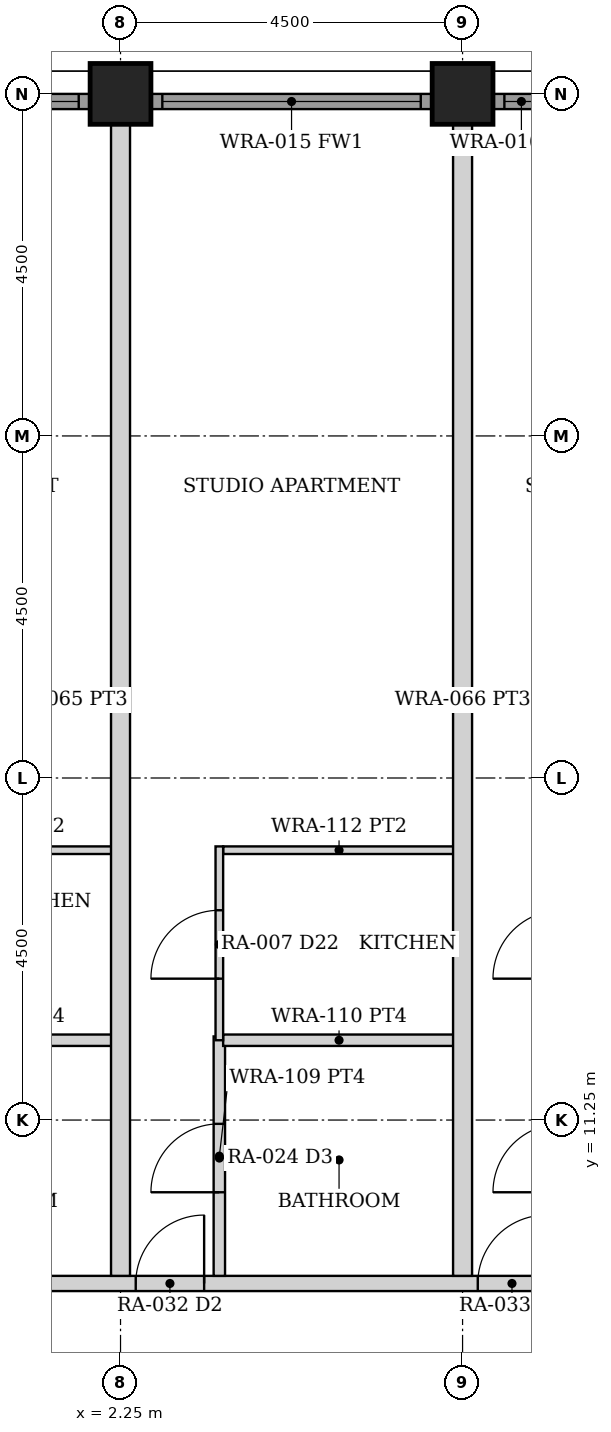
"""IFC4 building model, lengths in metres.
Left out: names, types, materials, properties, quantities, classifications, styles, units other than length and angle.
Written with IfcOpenShell. Run it as: python <this file> out.ifc"""

import sys

from ifc_helpers import new_model, si_unit, direction, frame, frame_2d, origin, origin_2d, place, context, subcontext, project, spatial, rectangle, hollow_rectangle, extrude, element, fill, save


model = new_model("IFC4")
c1 = context("Model", 3, precision=1e-05, world=origin(), true_north=direction((0.0, 1.0)))
c2 = subcontext(c1, "Body", "Model", "MODEL_VIEW")
j1 = project(units=[si_unit("LENGTHUNIT", "METRE"), si_unit("PLANEANGLEUNIT", "RADIAN")], contexts=[c1])
p1 = place(None, origin())
s1 = spatial("IfcSite", under=j1, at=p1, CompositionType="ELEMENT")
p2 = place(p1, origin())
s2 = spatial("IfcBuilding", under=s1, at=p2, CompositionType="ELEMENT")
p3 = place(p2, frame((0.0, 0.0, 26.5)))
s3 = spatial("IfcBuildingStorey", under=s2, at=p3, CompositionType="ELEMENT", Elevation=26.5)
for number, where, z_axis, x_axis in (
    (1, (2.25, 24.75, 0.0), (0.0, 0.0, 1.0), (0.0, 1.0, 0.0)),
    (2, (6.75, 24.75, 0.0), (0.0, 0.0, 1.0), (0.0, 1.0, 0.0)),
):
    element("IfcColumn", number, at=place(p3, frame(where, z_axis=z_axis, x_axis=x_axis)), inside=s3, PredefinedType="COLUMN", context=c2, shape_type="SweptSolid", body=[
        extrude(hollow_rectangle(XDim=0.8, YDim=0.8, WallThickness=0.08, at=origin_2d()), origin(), (0.0, 0.0, 1.0), 3.5),
    ])
p4 = place(p3, frame((-1.845, 24.65, 0.0), z_axis=(0.0, 0.0, 1.0), x_axis=(1.0, 0.0, 0.0)))
e3 = element("IfcWall", 3, at=p4, inside=s3, PredefinedType="SOLIDWALL", context=c2, shape_type="SweptSolid", body=[
    extrude(rectangle(XDim=3.69, YDim=0.2, at=frame_2d((1.845, 0.0))), origin(), (0.0, 0.0, 1.0), 2.379),
])
p5 = place(p4, frame((0.145, 0.0, 0.3)))
e4 = element("IfcOpeningElement", 4, at=p5, cuts=e3, PredefinedType="OPENING", context=c2, shape_type="SweptSolid", body=[
    extrude(rectangle(XDim=3.4, YDim=1.929, at=frame_2d((1.7, 0.964))), frame((0.0, 0.11, 0.0), z_axis=(0.0, -1.0, 0.0), x_axis=(1.0, 0.0, 0.0)), (0.0, 0.0, 1.0), 0.22),
])
p6 = place(p3, frame((2.655, 24.65, 0.0), z_axis=(0.0, 0.0, 1.0), x_axis=(1.0, 0.0, 0.0)))
e5 = element("IfcWall", 5, at=p6, inside=s3, PredefinedType="SOLIDWALL", context=c2, shape_type="SweptSolid", body=[
    extrude(rectangle(XDim=3.69, YDim=0.2, at=frame_2d((1.845, 0.0))), origin(), (0.0, 0.0, 1.0), 2.379),
])
p7 = place(p6, frame((0.145, 0.0, 0.3)))
e6 = element("IfcOpeningElement", 6, at=p7, cuts=e5, PredefinedType="OPENING", context=c2, shape_type="SweptSolid", body=[
    extrude(rectangle(XDim=3.4, YDim=1.929, at=frame_2d((1.7, 0.964))), frame((0.0, 0.11, 0.0), z_axis=(0.0, -1.0, 0.0), x_axis=(1.0, 0.0, 0.0)), (0.0, 0.0, 1.0), 0.22),
])
p8 = place(p3, frame((7.155, 24.65, 0.0), z_axis=(0.0, 0.0, 1.0), x_axis=(1.0, 0.0, 0.0)))
e7 = element("IfcWall", 7, at=p8, inside=s3, PredefinedType="SOLIDWALL", context=c2, shape_type="SweptSolid", body=[
    extrude(rectangle(XDim=3.69, YDim=0.2, at=frame_2d((1.845, 0.0))), origin(), (0.0, 0.0, 1.0), 2.379),
])
p9 = place(p8, frame((0.145, 0.0, 0.3)))
e8 = element("IfcOpeningElement", 8, at=p9, cuts=e7, PredefinedType="OPENING", context=c2, shape_type="SweptSolid", body=[
    extrude(rectangle(XDim=3.4, YDim=1.929, at=frame_2d((1.7, 0.964))), frame((0.0, 0.11, 0.0), z_axis=(0.0, -1.0, 0.0), x_axis=(1.0, 0.0, 0.0)), (0.0, 0.0, 1.0), 0.22),
])
p10 = place(p3, frame((-24.55, 9.1, 0.0), z_axis=(0.0, 0.0, 1.0), x_axis=(1.0, 0.0, 0.0)))
e9 = element("IfcWall", 9, at=p10, inside=s3, PredefinedType="PARTITIONING", context=c2, shape_type="SweptSolid", body=[
    extrude(rectangle(XDim=49.1, YDim=0.2, at=frame_2d((24.55, 0.0))), origin(), (0.0, 0.0, 1.0), 2.373),
])
p11 = place(p10, frame((5.1, 0.0, 0.0)))
e10 = element("IfcOpeningElement", 10, at=p11, cuts=e9, PredefinedType="OPENING", context=c2, shape_type="SweptSolid", body=[
    extrude(rectangle(XDim=0.9, YDim=2.1, at=frame_2d((0.45, 1.05))), frame((0.0, 0.11, 0.0), z_axis=(0.0, -1.0, 0.0), x_axis=(1.0, 0.0, 0.0)), (0.0, 0.0, 1.0), 0.22),
])
p12 = place(p10, frame((9.0, 0.0, 0.0)))
e11 = element("IfcOpeningElement", 11, at=p12, cuts=e9, PredefinedType="OPENING", context=c2, shape_type="SweptSolid", body=[
    extrude(rectangle(XDim=0.9, YDim=2.1, at=frame_2d((0.45, 1.05))), frame((0.0, 0.11, 0.0), z_axis=(0.0, -1.0, 0.0), x_axis=(1.0, 0.0, 0.0)), (0.0, 0.0, 1.0), 0.22),
])
p13 = place(p10, frame((13.5, 0.0, 0.0)))
e12 = element("IfcOpeningElement", 12, at=p13, cuts=e9, PredefinedType="OPENING", context=c2, shape_type="SweptSolid", body=[
    extrude(rectangle(XDim=0.9, YDim=2.1, at=frame_2d((0.45, 1.05))), frame((0.0, 0.11, 0.0), z_axis=(0.0, -1.0, 0.0), x_axis=(1.0, 0.0, 0.0)), (0.0, 0.0, 1.0), 0.22),
])
p14 = place(p10, frame((18.0, 0.0, 0.0)))
e13 = element("IfcOpeningElement", 13, at=p14, cuts=e9, PredefinedType="OPENING", context=c2, shape_type="SweptSolid", body=[
    extrude(rectangle(XDim=0.9, YDim=2.1, at=frame_2d((0.45, 1.05))), frame((0.0, 0.11, 0.0), z_axis=(0.0, -1.0, 0.0), x_axis=(1.0, 0.0, 0.0)), (0.0, 0.0, 1.0), 0.22),
])
p15 = place(p10, frame((22.5, 0.0, 0.0)))
e14 = element("IfcOpeningElement", 14, at=p15, cuts=e9, PredefinedType="OPENING", context=c2, shape_type="SweptSolid", body=[
    extrude(rectangle(XDim=0.9, YDim=2.1, at=frame_2d((0.45, 1.05))), frame((0.0, 0.11, 0.0), z_axis=(0.0, -1.0, 0.0), x_axis=(1.0, 0.0, 0.0)), (0.0, 0.0, 1.0), 0.22),
])
p16 = place(p10, frame((27.0, 0.0, 0.0)))
e15 = element("IfcOpeningElement", 15, at=p16, cuts=e9, PredefinedType="OPENING", context=c2, shape_type="SweptSolid", body=[
    extrude(rectangle(XDim=0.9, YDim=2.1, at=frame_2d((0.45, 1.05))), frame((0.0, 0.11, 0.0), z_axis=(0.0, -1.0, 0.0), x_axis=(1.0, 0.0, 0.0)), (0.0, 0.0, 1.0), 0.22),
])
p17 = place(p10, frame((31.5, 0.0, 0.0)))
e16 = element("IfcOpeningElement", 16, at=p17, cuts=e9, PredefinedType="OPENING", context=c2, shape_type="SweptSolid", body=[
    extrude(rectangle(XDim=0.9, YDim=2.1, at=frame_2d((0.45, 1.05))), frame((0.0, 0.11, 0.0), z_axis=(0.0, -1.0, 0.0), x_axis=(1.0, 0.0, 0.0)), (0.0, 0.0, 1.0), 0.22),
])
p18 = place(p10, frame((36.0, 0.0, 0.0)))
e17 = element("IfcOpeningElement", 17, at=p18, cuts=e9, PredefinedType="OPENING", context=c2, shape_type="SweptSolid", body=[
    extrude(rectangle(XDim=0.9, YDim=2.1, at=frame_2d((0.45, 1.05))), frame((0.0, 0.11, 0.0), z_axis=(0.0, -1.0, 0.0), x_axis=(1.0, 0.0, 0.0)), (0.0, 0.0, 1.0), 0.22),
])
p19 = place(p10, frame((43.1, 0.0, 0.0)))
e18 = element("IfcOpeningElement", 18, at=p19, cuts=e9, PredefinedType="OPENING", context=c2, shape_type="SweptSolid", body=[
    extrude(rectangle(XDim=0.9, YDim=2.1, at=frame_2d((0.45, 1.05))), frame((0.0, 0.11, 0.0), z_axis=(0.0, -1.0, 0.0), x_axis=(1.0, 0.0, 0.0)), (0.0, 0.0, 1.0), 0.22),
])
p20 = place(p3, frame((-0.9, 12.3, 0.0), z_axis=(0.0, 0.0, 1.0), x_axis=(1.0, 0.0, 0.0)))
e19 = element("IfcWall", 19, at=p20, inside=s3, PredefinedType="PARTITIONING", context=c2, shape_type="SweptSolid", body=[
    extrude(rectangle(XDim=3.05, YDim=0.15, at=frame_2d((1.525, 0.0))), origin(), (0.0, 0.0, 1.0), 2.373),
])
p21 = place(p3, frame((-0.9, 14.8, 0.0), z_axis=(0.0, 0.0, 1.0), x_axis=(1.0, 0.0, 0.0)))
e20 = element("IfcWall", 20, at=p21, inside=s3, PredefinedType="PARTITIONING", context=c2, shape_type="SweptSolid", body=[
    extrude(rectangle(XDim=3.05, YDim=0.1, at=frame_2d((1.525, 0.0))), origin(), (0.0, 0.0, 1.0), 2.373),
])
p22 = place(p3, frame((3.55, 9.2, 0.0), z_axis=(0.0, 0.0, 1.0), x_axis=(0.0, 1.0, 0.0)))
e21 = element("IfcWall", 21, at=p22, inside=s3, PredefinedType="PARTITIONING", context=c2, shape_type="SweptSolid", body=[
    extrude(rectangle(XDim=3.15, YDim=0.15, at=frame_2d((1.575, 0.0))), origin(), (0.0, 0.0, 1.0), 2.373),
])
p23 = place(p22, frame((1.1, 0.0, 0.0)))
e22 = element("IfcOpeningElement", 22, at=p23, cuts=e21, PredefinedType="OPENING", context=c2, shape_type="SweptSolid", body=[
    extrude(rectangle(XDim=0.9, YDim=2.1, at=frame_2d((0.45, 1.05))), frame((0.0, 0.085, 0.0), z_axis=(0.0, -1.0, 0.0), x_axis=(1.0, 0.0, 0.0)), (0.0, 0.0, 1.0), 0.17),
])
p24 = place(p3, frame((3.6, 12.3, 0.0), z_axis=(0.0, 0.0, 1.0), x_axis=(1.0, 0.0, 0.0)))
e23 = element("IfcWall", 23, at=p24, inside=s3, PredefinedType="PARTITIONING", context=c2, shape_type="SweptSolid", body=[
    extrude(rectangle(XDim=3.05, YDim=0.15, at=frame_2d((1.525, 0.0))), origin(), (0.0, 0.0, 1.0), 2.373),
])
p25 = place(p3, frame((3.6, 14.8, 0.0), z_axis=(0.0, 0.0, 1.0), x_axis=(1.0, 0.0, 0.0)))
e24 = element("IfcWall", 24, at=p25, inside=s3, PredefinedType="PARTITIONING", context=c2, shape_type="SweptSolid", body=[
    extrude(rectangle(XDim=3.05, YDim=0.1, at=frame_2d((1.525, 0.0))), origin(), (0.0, 0.0, 1.0), 2.373),
])
p26 = place(p3, frame((3.55, 12.3, 0.0), z_axis=(0.0, 0.0, 1.0), x_axis=(0.0, 1.0, 0.0)))
e25 = element("IfcWall", 25, at=p26, inside=s3, PredefinedType="PARTITIONING", context=c2, shape_type="SweptSolid", body=[
    extrude(rectangle(XDim=2.55, YDim=0.1, at=frame_2d((1.275, 0.0))), origin(), (0.0, 0.0, 1.0), 2.373),
])
p27 = place(p26, frame((0.81, 0.0, 0.0)))
e26 = element("IfcOpeningElement", 26, at=p27, cuts=e25, PredefinedType="OPENING", context=c2, shape_type="SweptSolid", body=[
    extrude(rectangle(XDim=0.9, YDim=2.1, at=frame_2d((0.45, 1.05))), frame((0.0, 0.06, 0.0), z_axis=(0.0, -1.0, 0.0), x_axis=(1.0, 0.0, 0.0)), (0.0, 0.0, 1.0), 0.12),
])
for number, where, z_axis, x_axis in (
    (27, (2.25, 9.2, 0.0), (0.0, 0.0, 1.0), (0.0, 1.0, 0.0)),
    (28, (6.75, 9.2, 0.0), (0.0, 0.0, 1.0), (0.0, 1.0, 0.0)),
):
    element("IfcWall", number, at=place(p3, frame(where, z_axis=z_axis, x_axis=x_axis)), inside=s3, PredefinedType="PARTITIONING", context=c2, shape_type="SweptSolid", body=[
        extrude(rectangle(XDim=15.15, YDim=0.25, at=frame_2d((7.575, 0.0))), origin(), (0.0, 0.0, 1.0), 2.373),
    ])
p28 = place(p5, origin())
e29 = element("IfcWindow", 29, at=p28, inside=s3, PartitioningType="SINGLE_PANEL", PredefinedType="WINDOW", context=c2, shape_type="SweptSolid", body=[
    extrude(rectangle(XDim=3.4, YDim=1.929, at=frame_2d((1.7, 0.964))), frame((0.0, 0.03, 0.0), z_axis=(0.0, -1.0, 0.0), x_axis=(1.0, 0.0, 0.0)), (0.0, 0.0, 1.0), 0.06),
])
fill(e4, e29)
p29 = place(p7, origin())
e30 = element("IfcWindow", 30, at=p29, inside=s3, PartitioningType="SINGLE_PANEL", PredefinedType="WINDOW", context=c2, shape_type="SweptSolid", body=[
    extrude(rectangle(XDim=3.4, YDim=1.929, at=frame_2d((1.7, 0.964))), frame((0.0, 0.03, 0.0), z_axis=(0.0, -1.0, 0.0), x_axis=(1.0, 0.0, 0.0)), (0.0, 0.0, 1.0), 0.06),
])
fill(e6, e30)
p30 = place(p9, origin())
e31 = element("IfcWindow", 31, at=p30, inside=s3, PartitioningType="SINGLE_PANEL", PredefinedType="WINDOW", context=c2, shape_type="SweptSolid", body=[
    extrude(rectangle(XDim=3.4, YDim=1.929, at=frame_2d((1.7, 0.964))), frame((0.0, 0.03, 0.0), z_axis=(0.0, -1.0, 0.0), x_axis=(1.0, 0.0, 0.0)), (0.0, 0.0, 1.0), 0.06),
])
fill(e8, e31)
p31 = place(p16, origin())
e32 = element("IfcDoor", 32, at=p31, inside=s3, OperationType="SINGLE_SWING_RIGHT", PredefinedType="DOOR", context=c2, shape_type="SweptSolid", body=[
    extrude(rectangle(XDim=0.9, YDim=2.1, at=frame_2d((0.45, 1.05))), frame((0.0, 0.025, 0.0), z_axis=(0.0, -1.0, 0.0), x_axis=(1.0, 0.0, 0.0)), (0.0, 0.0, 1.0), 0.05),
])
fill(e15, e32)
p32 = place(p23, origin())
e33 = element("IfcDoor", 33, at=p32, inside=s3, OperationType="SINGLE_SWING_LEFT", PredefinedType="DOOR", context=c2, shape_type="SweptSolid", body=[
    extrude(rectangle(XDim=0.9, YDim=2.1, at=frame_2d((0.45, 1.05))), frame((0.0, 0.025, 0.0), z_axis=(0.0, -1.0, 0.0), x_axis=(1.0, 0.0, 0.0)), (0.0, 0.0, 1.0), 0.05),
])
fill(e22, e33)
p33 = place(p27, origin())
e34 = element("IfcDoor", 34, at=p33, inside=s3, OperationType="SINGLE_SWING_LEFT", PredefinedType="DOOR", context=c2, shape_type="SweptSolid", body=[
    extrude(rectangle(XDim=0.9, YDim=2.1, at=frame_2d((0.45, 1.05))), frame((0.0, 0.025, 0.0), z_axis=(0.0, -1.0, 0.0), x_axis=(1.0, 0.0, 0.0)), (0.0, 0.0, 1.0), 0.05),
])
fill(e26, e34)
p34 = place(p17, origin())
e35 = element("IfcDoor", 35, at=p34, inside=s3, OperationType="SINGLE_SWING_RIGHT", PredefinedType="DOOR", context=c2, shape_type="SweptSolid", body=[
    extrude(rectangle(XDim=0.9, YDim=2.1, at=frame_2d((0.45, 1.05))), frame((0.0, 0.025, 0.0), z_axis=(0.0, -1.0, 0.0), x_axis=(1.0, 0.0, 0.0)), (0.0, 0.0, 1.0), 0.05),
])
fill(e16, e35)
save(model, sys.argv[1])
